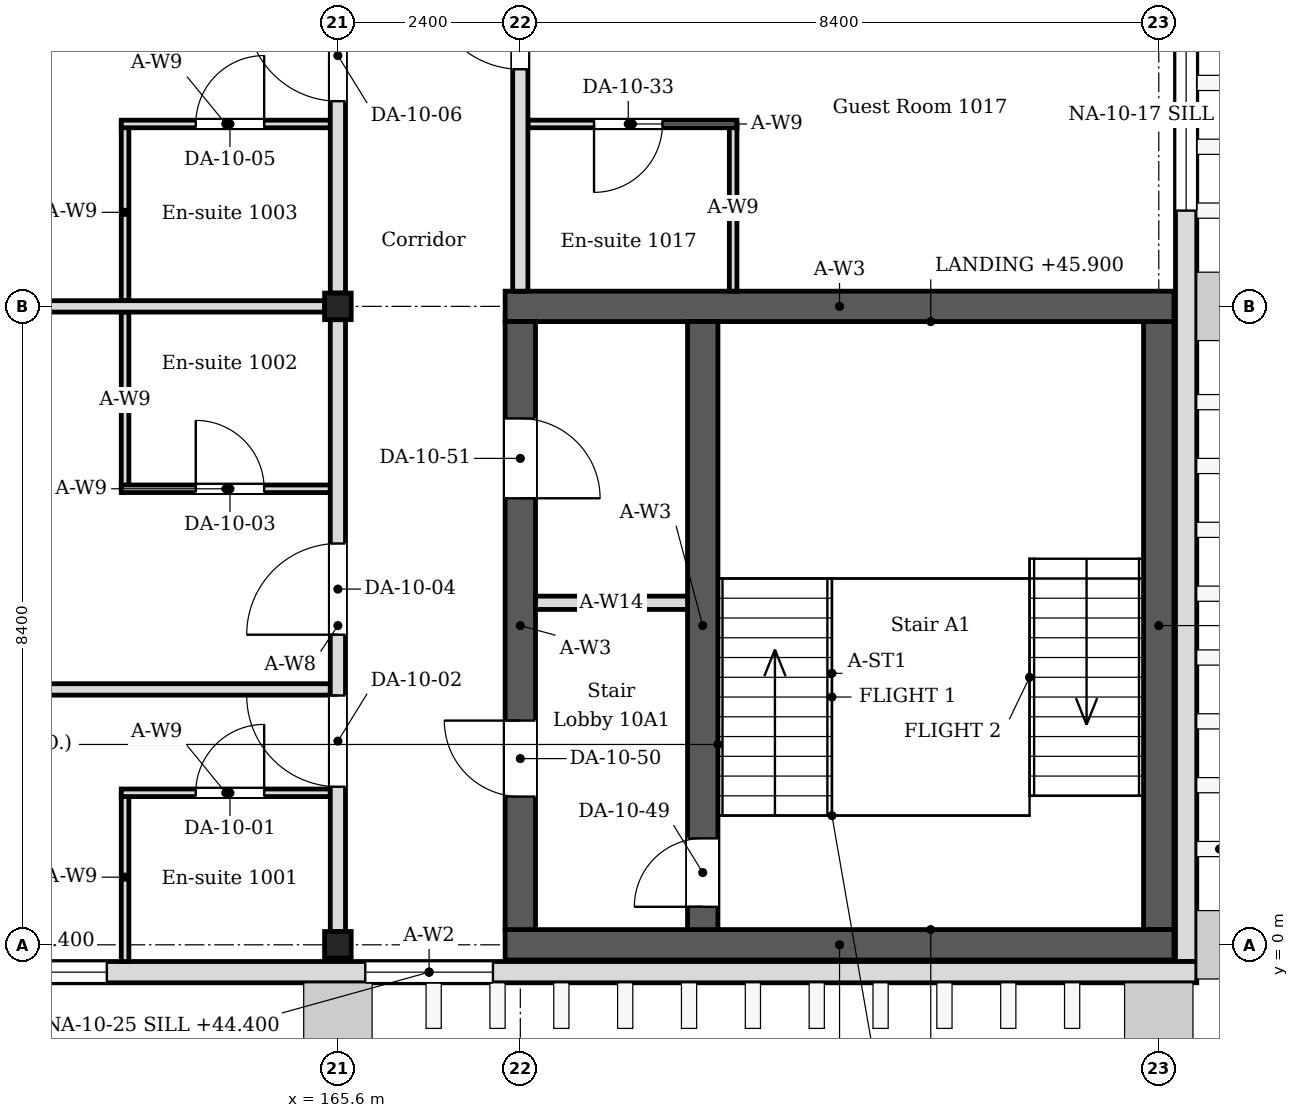
"""IFC4 building model, lengths in metres.
Left out: names, types, materials, properties, quantities, classifications, styles, units other than length and angle.
Written with IfcOpenShell. Run it as: python <this file> out.ifc"""

import sys

from ifc_helpers import new_model, si_unit, direction, frame, frame_2d, origin, origin_2d, place, context, subcontext, project, spatial, rectangle, i_section, extrude, element, fill, save


model = new_model("IFC4")
c1 = context("Model", 3, precision=1e-05, world=origin(), true_north=direction((0.0, 1.0)))
c2 = subcontext(c1, "Body", "Model", "MODEL_VIEW")
j1 = project(units=[si_unit("LENGTHUNIT", "METRE"), si_unit("PLANEANGLEUNIT", "RADIAN")], contexts=[c1])
p1 = place(None, origin())
s1 = spatial("IfcSite", under=j1, at=p1, CompositionType="ELEMENT")
p2 = place(p1, origin())
s2 = spatial("IfcBuilding", under=s1, at=p2, CompositionType="ELEMENT")
p3 = place(p2, frame((0.0, 0.0, 43.8)))
s3 = spatial("IfcBuildingStorey", under=s2, at=p3, CompositionType="ELEMENT", Elevation=43.8)
for number, where, z_axis, x_axis in (
    (1, (165.6, 0.0, 0.0), (0.0, 0.0, 1.0), (1.0, 0.0, 0.0)),
    (2, (165.6, 8.4, 0.0), (0.0, 0.0, 1.0), (1.0, 0.0, 0.0)),
):
    element("IfcColumn", number, at=place(p3, frame(where, z_axis=z_axis, x_axis=x_axis)), inside=s3, PredefinedType="COLUMN", context=c2, shape_type="SweptSolid", body=[
        extrude(i_section(OverallWidth=0.35, OverallDepth=0.35, WebThickness=0.012, FlangeThickness=0.019, FilletRadius=0.013, at=origin_2d()), origin(), (0.0, 0.0, 1.0), 4.2),
    ])
for number, where, z_axis, x_axis in (
    (3, (167.8, 0.0, 0.0), (0.0, 0.0, 1.0), (1.0, 0.0, 0.0)),
    (4, (167.8, 8.4, 0.0), (0.0, 0.0, 1.0), (1.0, 0.0, 0.0)),
):
    element("IfcWall", number, at=place(p3, frame(where, z_axis=z_axis, x_axis=x_axis)), inside=s3, PredefinedType="SOLIDWALL", context=c2, shape_type="SweptSolid", body=[
        extrude(rectangle(XDim=8.8, YDim=0.4, at=frame_2d((4.4, 0.0))), origin(), (0.0, 0.0, 1.0), 4.05),
    ])
p4 = place(p3, frame((168.0, 0.2, 0.0), z_axis=(0.0, 0.0, 1.0), x_axis=(0.0, 1.0, 0.0)))
e5 = element("IfcWall", 5, at=p4, inside=s3, PredefinedType="SOLIDWALL", context=c2, shape_type="SweptSolid", body=[
    extrude(rectangle(XDim=8.0, YDim=0.4, at=frame_2d((4.0, 0.0))), origin(), (0.0, 0.0, 1.0), 4.05),
])
p5 = place(p4, frame((1.75, 0.0, 0.0)))
e6 = element("IfcOpeningElement", 6, at=p5, cuts=e5, PredefinedType="OPENING", context=c2, shape_type="SweptSolid", body=[
    extrude(rectangle(XDim=1.0, YDim=2.1, at=frame_2d((0.5, 1.05))), frame((0.0, 0.21, 0.0), z_axis=(0.0, -1.0, 0.0), x_axis=(1.0, 0.0, 0.0)), (0.0, 0.0, 1.0), 0.42),
])
p6 = place(p4, frame((5.675, 0.0, 0.0)))
e7 = element("IfcOpeningElement", 7, at=p6, cuts=e5, PredefinedType="OPENING", context=c2, shape_type="SweptSolid", body=[
    extrude(rectangle(XDim=1.05, YDim=2.1, at=frame_2d((0.525, 1.05))), frame((0.0, 0.21, 0.0), z_axis=(0.0, -1.0, 0.0), x_axis=(1.0, 0.0, 0.0)), (0.0, 0.0, 1.0), 0.42),
])
p7 = place(p3, frame((176.4, 0.2, 0.0), z_axis=(0.0, 0.0, 1.0), x_axis=(0.0, 1.0, 0.0)))
e8 = element("IfcWall", 8, at=p7, inside=s3, PredefinedType="SOLIDWALL", context=c2, shape_type="SweptSolid", body=[
    extrude(rectangle(XDim=8.0, YDim=0.4, at=frame_2d((4.0, 0.0))), origin(), (0.0, 0.0, 1.0), 4.05),
])
p8 = place(p3, frame((176.76, -0.22, 0.0), z_axis=(0.0, 0.0, 1.0), x_axis=(0.0, 1.0, 0.0)))
e9 = element("IfcWall", 9, at=p8, inside=s3, PredefinedType="SOLIDWALL", context=c2, shape_type="SweptSolid", body=[
    extrude(rectangle(XDim=42.57, YDim=0.28, at=frame_2d((21.285, 0.0))), origin(), (0.0, 0.0, 1.0), 4.05),
])
p9 = place(p8, frame((9.88, 0.0, 0.6)))
e10 = element("IfcOpeningElement", 10, at=p9, cuts=e9, PredefinedType="OPENING", context=c2, shape_type="SweptSolid", body=[
    extrude(rectangle(XDim=2.52, YDim=2.4, at=frame_2d((1.26, 1.2))), frame((0.0, 0.15, 0.0), z_axis=(0.0, -1.0, 0.0), x_axis=(1.0, 0.0, 0.0)), (0.0, 0.0, 1.0), 0.3),
])
p10 = place(p8, frame((14.08, 0.0, 0.6)))
e11 = element("IfcOpeningElement", 11, at=p10, cuts=e9, PredefinedType="OPENING", context=c2, shape_type="SweptSolid", body=[
    extrude(rectangle(XDim=2.52, YDim=2.4, at=frame_2d((1.26, 1.2))), frame((0.0, 0.15, 0.0), z_axis=(0.0, -1.0, 0.0), x_axis=(1.0, 0.0, 0.0)), (0.0, 0.0, 1.0), 0.3),
])
p11 = place(p8, frame((17.86, 0.0, 0.6)))
e12 = element("IfcOpeningElement", 12, at=p11, cuts=e9, PredefinedType="OPENING", context=c2, shape_type="SweptSolid", body=[
    extrude(rectangle(XDim=2.52, YDim=2.4, at=frame_2d((1.26, 1.2))), frame((0.0, 0.15, 0.0), z_axis=(0.0, -1.0, 0.0), x_axis=(1.0, 0.0, 0.0)), (0.0, 0.0, 1.0), 0.3),
])
p12 = place(p8, frame((22.06, 0.0, 0.45)))
e13 = element("IfcOpeningElement", 13, at=p12, cuts=e9, PredefinedType="OPENING", context=c2, shape_type="SweptSolid", body=[
    extrude(rectangle(XDim=2.52, YDim=2.1, at=frame_2d((1.26, 1.05))), frame((0.0, 0.15, 0.0), z_axis=(0.0, -1.0, 0.0), x_axis=(1.0, 0.0, 0.0)), (0.0, 0.0, 1.0), 0.3),
])
p13 = place(p3, frame((156.7, -0.36, 0.0), z_axis=(0.0, 0.0, 1.0), x_axis=(1.0, 0.0, 0.0)))
e14 = element("IfcWall", 14, at=p13, inside=s3, PredefinedType="SOLIDWALL", context=c2, shape_type="SweptSolid", body=[
    extrude(rectangle(XDim=20.2, YDim=0.28, at=frame_2d((10.1, 0.0))), origin(), (0.0, 0.0, 1.0), 4.05),
])
p14 = place(p13, frame((9.26, 0.0, 0.6)))
e15 = element("IfcOpeningElement", 15, at=p14, cuts=e14, PredefinedType="OPENING", context=c2, shape_type="SweptSolid", body=[
    extrude(rectangle(XDim=1.68, YDim=2.4, at=frame_2d((0.84, 1.2))), frame((0.0, 0.15, 0.0), z_axis=(0.0, -1.0, 0.0), x_axis=(1.0, 0.0, 0.0)), (0.0, 0.0, 1.0), 0.3),
])
p15 = place(p13, frame((3.34, 0.0, 0.6)))
e16 = element("IfcOpeningElement", 16, at=p15, cuts=e14, PredefinedType="OPENING", context=c2, shape_type="SweptSolid", body=[
    extrude(rectangle(XDim=2.52, YDim=2.4, at=frame_2d((1.26, 1.2))), frame((0.0, 0.15, 0.0), z_axis=(0.0, -1.0, 0.0), x_axis=(1.0, 0.0, 0.0)), (0.0, 0.0, 1.0), 0.3),
])
p16 = place(p3, frame((162.8, -0.22, 0.0), z_axis=(0.0, 0.0, 1.0), x_axis=(0.0, 1.0, 0.0)))
e17 = element("IfcWall", 17, at=p16, inside=s3, PredefinedType="PARTITIONING", context=c2, shape_type="SweptSolid", body=[
    extrude(rectangle(XDim=2.22, YDim=0.1, at=frame_2d((1.11, 0.0))), origin(), (0.0, 0.0, 1.0), 4.05),
])
p17 = place(p3, frame((162.75, 2.0, 0.0), z_axis=(0.0, 0.0, 1.0), x_axis=(1.0, 0.0, 0.0)))
e18 = element("IfcWall", 18, at=p17, inside=s3, PredefinedType="PARTITIONING", context=c2, shape_type="SweptSolid", body=[
    extrude(rectangle(XDim=2.75, YDim=0.1, at=frame_2d((1.375, 0.0))), origin(), (0.0, 0.0, 1.0), 4.05),
])
p18 = place(p17, frame((0.98, 0.0, 0.0)))
e19 = element("IfcOpeningElement", 19, at=p18, cuts=e18, PredefinedType="OPENING", context=c2, shape_type="SweptSolid", body=[
    extrude(rectangle(XDim=0.9, YDim=2.1, at=frame_2d((0.45, 1.05))), frame((0.0, 0.06, 0.0), z_axis=(0.0, -1.0, 0.0), x_axis=(1.0, 0.0, 0.0)), (0.0, 0.0, 1.0), 0.12),
])
p19 = place(p3, frame((162.8, 6.0, 0.0), z_axis=(0.0, 0.0, 1.0), x_axis=(0.0, 1.0, 0.0)))
e20 = element("IfcWall", 20, at=p19, inside=s3, PredefinedType="PARTITIONING", context=c2, shape_type="SweptSolid", body=[
    extrude(rectangle(XDim=2.325, YDim=0.1, at=frame_2d((1.163, 0.0))), origin(), (0.0, 0.0, 1.0), 4.05),
])
p20 = place(p3, frame((162.75, 6.0, 0.0), z_axis=(0.0, 0.0, 1.0), x_axis=(1.0, 0.0, 0.0)))
e21 = element("IfcWall", 21, at=p20, inside=s3, PredefinedType="PARTITIONING", context=c2, shape_type="SweptSolid", body=[
    extrude(rectangle(XDim=2.75, YDim=0.1, at=frame_2d((1.375, 0.0))), origin(), (0.0, 0.0, 1.0), 4.05),
])
p21 = place(p20, frame((0.98, 0.0, 0.0)))
e22 = element("IfcOpeningElement", 22, at=p21, cuts=e21, PredefinedType="OPENING", context=c2, shape_type="SweptSolid", body=[
    extrude(rectangle(XDim=0.9, YDim=2.1, at=frame_2d((0.45, 1.05))), frame((0.0, 0.06, 0.0), z_axis=(0.0, -1.0, 0.0), x_axis=(1.0, 0.0, 0.0)), (0.0, 0.0, 1.0), 0.12),
])
p22 = place(p3, frame((162.8, 8.475, 0.0), z_axis=(0.0, 0.0, 1.0), x_axis=(0.0, 1.0, 0.0)))
e23 = element("IfcWall", 23, at=p22, inside=s3, PredefinedType="PARTITIONING", context=c2, shape_type="SweptSolid", body=[
    extrude(rectangle(XDim=2.325, YDim=0.1, at=frame_2d((1.163, 0.0))), origin(), (0.0, 0.0, 1.0), 4.05),
])
p23 = place(p3, frame((162.75, 10.8, 0.0), z_axis=(0.0, 0.0, 1.0), x_axis=(1.0, 0.0, 0.0)))
e24 = element("IfcWall", 24, at=p23, inside=s3, PredefinedType="PARTITIONING", context=c2, shape_type="SweptSolid", body=[
    extrude(rectangle(XDim=2.75, YDim=0.1, at=frame_2d((1.375, 0.0))), origin(), (0.0, 0.0, 1.0), 4.05),
])
p24 = place(p23, frame((0.98, 0.0, 0.0)))
e25 = element("IfcOpeningElement", 25, at=p24, cuts=e24, PredefinedType="OPENING", context=c2, shape_type="SweptSolid", body=[
    extrude(rectangle(XDim=0.9, YDim=2.1, at=frame_2d((0.45, 1.05))), frame((0.0, 0.06, 0.0), z_axis=(0.0, -1.0, 0.0), x_axis=(1.0, 0.0, 0.0)), (0.0, 0.0, 1.0), 0.12),
])
p25 = place(p3, frame((170.8, 8.6, 0.0), z_axis=(0.0, 0.0, 1.0), x_axis=(0.0, 1.0, 0.0)))
e26 = element("IfcWall", 26, at=p25, inside=s3, PredefinedType="PARTITIONING", context=c2, shape_type="SweptSolid", body=[
    extrude(rectangle(XDim=2.2, YDim=0.1, at=frame_2d((1.1, 0.0))), origin(), (0.0, 0.0, 1.0), 4.05),
])
p26 = place(p3, frame((170.85, 10.8, 0.0), z_axis=(0.0, 0.0, 1.0), x_axis=(-1.0, 0.0, 0.0)))
e27 = element("IfcWall", 27, at=p26, inside=s3, PredefinedType="PARTITIONING", context=c2, shape_type="SweptSolid", body=[
    extrude(rectangle(XDim=2.75, YDim=0.1, at=frame_2d((1.375, 0.0))), origin(), (0.0, 0.0, 1.0), 4.05),
])
p27 = place(p26, frame((0.98, 0.0, 0.0)))
e28 = element("IfcOpeningElement", 28, at=p27, cuts=e27, PredefinedType="OPENING", context=c2, shape_type="SweptSolid", body=[
    extrude(rectangle(XDim=0.9, YDim=2.1, at=frame_2d((0.45, 1.05))), frame((0.0, 0.06, 0.0), z_axis=(0.0, -1.0, 0.0), x_axis=(1.0, 0.0, 0.0)), (0.0, 0.0, 1.0), 0.12),
])
p28 = place(p3, frame((157.375, 8.4, 0.0), z_axis=(0.0, 0.0, 1.0), x_axis=(1.0, 0.0, 0.0)))
e29 = element("IfcWall", 29, at=p28, inside=s3, PredefinedType="PARTITIONING", context=c2, shape_type="SweptSolid", body=[
    extrude(rectangle(XDim=8.05, YDim=0.15, at=frame_2d((4.025, 0.0))), origin(), (0.0, 0.0, 1.0), 3.604),
])
p29 = place(p3, frame((156.98, 3.36, 0.0), z_axis=(0.0, 0.0, 1.0), x_axis=(1.0, 0.0, 0.0)))
e30 = element("IfcWall", 30, at=p29, inside=s3, PredefinedType="PARTITIONING", context=c2, shape_type="SweptSolid", body=[
    extrude(rectangle(XDim=8.52, YDim=0.15, at=frame_2d((4.26, 0.0))), origin(), (0.0, 0.0, 1.0), 3.604),
])
p30 = place(p3, frame((165.6, 0.175, 0.0), z_axis=(0.0, 0.0, 1.0), x_axis=(0.0, 1.0, 0.0)))
e31 = element("IfcWall", 31, at=p30, inside=s3, PredefinedType="PARTITIONING", context=c2, shape_type="SweptSolid", body=[
    extrude(rectangle(XDim=8.05, YDim=0.2, at=frame_2d((4.025, 0.0))), origin(), (0.0, 0.0, 1.0), 3.45),
])
p31 = place(p30, frame((1.905, 0.0, 0.0)))
e32 = element("IfcOpeningElement", 32, at=p31, cuts=e31, PredefinedType="OPENING", context=c2, shape_type="SweptSolid", body=[
    extrude(rectangle(XDim=1.2, YDim=2.1, at=frame_2d((0.6, 1.05))), frame((0.0, 0.11, 0.0), z_axis=(0.0, -1.0, 0.0), x_axis=(1.0, 0.0, 0.0)), (0.0, 0.0, 1.0), 0.22),
])
p32 = place(p30, frame((3.905, 0.0, 0.0)))
e33 = element("IfcOpeningElement", 33, at=p32, cuts=e31, PredefinedType="OPENING", context=c2, shape_type="SweptSolid", body=[
    extrude(rectangle(XDim=1.2, YDim=2.1, at=frame_2d((0.6, 1.05))), frame((0.0, 0.11, 0.0), z_axis=(0.0, -1.0, 0.0), x_axis=(1.0, 0.0, 0.0)), (0.0, 0.0, 1.0), 0.22),
])
p33 = place(p3, frame((165.6, 8.575, 0.0), z_axis=(0.0, 0.0, 1.0), x_axis=(0.0, 1.0, 0.0)))
e34 = element("IfcWall", 34, at=p33, inside=s3, PredefinedType="PARTITIONING", context=c2, shape_type="SweptSolid", body=[
    extrude(rectangle(XDim=8.05, YDim=0.2, at=frame_2d((4.025, 0.0))), origin(), (0.0, 0.0, 1.0), 3.45),
])
p34 = place(p33, frame((2.525, 0.0, 0.0)))
e35 = element("IfcOpeningElement", 35, at=p34, cuts=e34, PredefinedType="OPENING", context=c2, shape_type="SweptSolid", body=[
    extrude(rectangle(XDim=1.2, YDim=2.1, at=frame_2d((0.6, 1.05))), frame((0.0, 0.11, 0.0), z_axis=(0.0, -1.0, 0.0), x_axis=(1.0, 0.0, 0.0)), (0.0, 0.0, 1.0), 0.22),
])
p35 = place(p33, frame((4.325, 0.0, 0.0)))
e36 = element("IfcOpeningElement", 36, at=p35, cuts=e34, PredefinedType="OPENING", context=c2, shape_type="SweptSolid", body=[
    extrude(rectangle(XDim=1.2, YDim=2.1, at=frame_2d((0.6, 1.05))), frame((0.0, 0.11, 0.0), z_axis=(0.0, -1.0, 0.0), x_axis=(1.0, 0.0, 0.0)), (0.0, 0.0, 1.0), 0.22),
])
p36 = place(p3, frame((168.0, 8.6, 0.0), z_axis=(0.0, 0.0, 1.0), x_axis=(0.0, 1.0, 0.0)))
e37 = element("IfcWall", 37, at=p36, inside=s3, PredefinedType="PARTITIONING", context=c2, shape_type="SweptSolid", body=[
    extrude(rectangle(XDim=8.025, YDim=0.2, at=frame_2d((4.012, 0.0))), origin(), (0.0, 0.0, 1.0), 3.45),
])
p37 = place(p36, frame((2.92, 0.0, 0.0)))
e38 = element("IfcOpeningElement", 38, at=p37, cuts=e37, PredefinedType="OPENING", context=c2, shape_type="SweptSolid", body=[
    extrude(rectangle(XDim=1.2, YDim=2.1, at=frame_2d((0.6, 1.05))), frame((0.0, 0.11, 0.0), z_axis=(0.0, -1.0, 0.0), x_axis=(1.0, 0.0, 0.0)), (0.0, 0.0, 1.0), 0.22),
])
p38 = place(p36, frame((4.92, 0.0, 0.0)))
e39 = element("IfcOpeningElement", 39, at=p38, cuts=e37, PredefinedType="OPENING", context=c2, shape_type="SweptSolid", body=[
    extrude(rectangle(XDim=1.2, YDim=2.1, at=frame_2d((0.6, 1.05))), frame((0.0, 0.11, 0.0), z_axis=(0.0, -1.0, 0.0), x_axis=(1.0, 0.0, 0.0)), (0.0, 0.0, 1.0), 0.22),
])
p39 = place(p3, frame((170.4, 0.2, 0.0), z_axis=(0.0, 0.0, 1.0), x_axis=(0.0, 1.0, 0.0)))
e40 = element("IfcWall", 40, at=p39, inside=s3, PredefinedType="SOLIDWALL", context=c2, shape_type="SweptSolid", body=[
    extrude(rectangle(XDim=8.0, YDim=0.4, at=frame_2d((4.0, 0.0))), origin(), (0.0, 0.0, 1.0), 4.05),
])
p40 = place(p39, frame((0.3, 0.0, 0.0)))
e41 = element("IfcOpeningElement", 41, at=p40, cuts=e40, PredefinedType="OPENING", context=c2, shape_type="SweptSolid", body=[
    extrude(rectangle(XDim=0.9, YDim=2.1, at=frame_2d((0.45, 1.05))), frame((0.0, 0.21, 0.0), z_axis=(0.0, -1.0, 0.0), x_axis=(1.0, 0.0, 0.0)), (0.0, 0.0, 1.0), 0.42),
])
p41 = place(p3, frame((168.2, 4.5, 0.0), z_axis=(0.0, 0.0, 1.0), x_axis=(1.0, 0.0, 0.0)))
e42 = element("IfcWall", 42, at=p41, inside=s3, PredefinedType="PARTITIONING", context=c2, shape_type="SweptSolid", body=[
    extrude(rectangle(XDim=2.0, YDim=0.175, at=frame_2d((1.0, 0.0))), origin(), (0.0, 0.0, 1.0), 4.05),
])
p42 = place(p9, origin())
e43 = element("IfcWindow", 43, at=p42, inside=s3, PartitioningType="SINGLE_PANEL", PredefinedType="WINDOW", context=c2, shape_type="SweptSolid", body=[
    extrude(rectangle(XDim=2.52, YDim=2.4, at=frame_2d((1.26, 1.2))), frame((0.0, 0.03, 0.0), z_axis=(0.0, -1.0, 0.0), x_axis=(1.0, 0.0, 0.0)), (0.0, 0.0, 1.0), 0.06),
])
fill(e10, e43)
p43 = place(p14, origin())
e44 = element("IfcWindow", 44, at=p43, inside=s3, PartitioningType="SINGLE_PANEL", PredefinedType="WINDOW", context=c2, shape_type="SweptSolid", body=[
    extrude(rectangle(XDim=1.68, YDim=2.4, at=frame_2d((0.84, 1.2))), frame((0.0, 0.03, 0.0), z_axis=(0.0, -1.0, 0.0), x_axis=(1.0, 0.0, 0.0)), (0.0, 0.0, 1.0), 0.06),
])
fill(e15, e44)
p44 = place(p15, origin())
e45 = element("IfcWindow", 45, at=p44, inside=s3, PartitioningType="SINGLE_PANEL", PredefinedType="WINDOW", context=c2, shape_type="SweptSolid", body=[
    extrude(rectangle(XDim=2.52, YDim=2.4, at=frame_2d((1.26, 1.2))), frame((0.0, 0.03, 0.0), z_axis=(0.0, -1.0, 0.0), x_axis=(1.0, 0.0, 0.0)), (0.0, 0.0, 1.0), 0.06),
])
fill(e16, e45)
p45 = place(p18, origin())
e46 = element("IfcDoor", 46, at=p45, inside=s3, OperationType="SINGLE_SWING_RIGHT", PredefinedType="DOOR", context=c2, shape_type="SweptSolid", body=[
    extrude(rectangle(XDim=0.9, YDim=2.1, at=frame_2d((0.45, 1.05))), frame((0.0, 0.025, 0.0), z_axis=(0.0, -1.0, 0.0), x_axis=(1.0, 0.0, 0.0)), (0.0, 0.0, 1.0), 0.05),
])
fill(e19, e46)
p46 = place(p31, origin())
e47 = element("IfcDoor", 47, at=p46, inside=s3, OperationType="SINGLE_SWING_RIGHT", PredefinedType="DOOR", context=c2, shape_type="SweptSolid", body=[
    extrude(rectangle(XDim=1.2, YDim=2.1, at=frame_2d((0.6, 1.05))), frame((0.0, 0.025, 0.0), z_axis=(0.0, -1.0, 0.0), x_axis=(1.0, 0.0, 0.0)), (0.0, 0.0, 1.0), 0.05),
])
fill(e32, e47)
p47 = place(p21, origin())
e48 = element("IfcDoor", 48, at=p47, inside=s3, OperationType="SINGLE_SWING_LEFT", PredefinedType="DOOR", context=c2, shape_type="SweptSolid", body=[
    extrude(rectangle(XDim=0.9, YDim=2.1, at=frame_2d((0.45, 1.05))), frame((0.0, 0.025, 0.0), z_axis=(0.0, -1.0, 0.0), x_axis=(1.0, 0.0, 0.0)), (0.0, 0.0, 1.0), 0.05),
])
fill(e22, e48)
p48 = place(p32, origin())
e49 = element("IfcDoor", 49, at=p48, inside=s3, OperationType="SINGLE_SWING_LEFT", PredefinedType="DOOR", context=c2, shape_type="SweptSolid", body=[
    extrude(rectangle(XDim=1.2, YDim=2.1, at=frame_2d((0.6, 1.05))), frame((0.0, 0.025, 0.0), z_axis=(0.0, -1.0, 0.0), x_axis=(1.0, 0.0, 0.0)), (0.0, 0.0, 1.0), 0.05),
])
fill(e33, e49)
p49 = place(p24, origin())
e50 = element("IfcDoor", 50, at=p49, inside=s3, OperationType="SINGLE_SWING_RIGHT", PredefinedType="DOOR", context=c2, shape_type="SweptSolid", body=[
    extrude(rectangle(XDim=0.9, YDim=2.1, at=frame_2d((0.45, 1.05))), frame((0.0, 0.025, 0.0), z_axis=(0.0, -1.0, 0.0), x_axis=(1.0, 0.0, 0.0)), (0.0, 0.0, 1.0), 0.05),
])
fill(e25, e50)
p50 = place(p34, origin())
e51 = element("IfcDoor", 51, at=p50, inside=s3, OperationType="SINGLE_SWING_RIGHT", PredefinedType="DOOR", context=c2, shape_type="SweptSolid", body=[
    extrude(rectangle(XDim=1.2, YDim=2.1, at=frame_2d((0.6, 1.05))), frame((0.0, 0.025, 0.0), z_axis=(0.0, -1.0, 0.0), x_axis=(1.0, 0.0, 0.0)), (0.0, 0.0, 1.0), 0.05),
])
fill(e35, e51)
p51 = place(p27, origin())
e52 = element("IfcDoor", 52, at=p51, inside=s3, OperationType="SINGLE_SWING_RIGHT", PredefinedType="DOOR", context=c2, shape_type="SweptSolid", body=[
    extrude(rectangle(XDim=0.9, YDim=2.1, at=frame_2d((0.45, 1.05))), frame((0.0, 0.025, 0.0), z_axis=(0.0, -1.0, 0.0), x_axis=(1.0, 0.0, 0.0)), (0.0, 0.0, 1.0), 0.05),
])
fill(e28, e52)
p52 = place(p37, origin())
e53 = element("IfcDoor", 53, at=p52, inside=s3, OperationType="SINGLE_SWING_RIGHT", PredefinedType="DOOR", context=c2, shape_type="SweptSolid", body=[
    extrude(rectangle(XDim=1.2, YDim=2.1, at=frame_2d((0.6, 1.05))), frame((0.0, 0.025, 0.0), z_axis=(0.0, -1.0, 0.0), x_axis=(1.0, 0.0, 0.0)), (0.0, 0.0, 1.0), 0.05),
])
fill(e38, e53)
p53 = place(p40, origin())
e54 = element("IfcDoor", 54, at=p53, inside=s3, OperationType="SINGLE_SWING_LEFT", PredefinedType="DOOR", context=c2, shape_type="SweptSolid", body=[
    extrude(rectangle(XDim=0.9, YDim=2.1, at=frame_2d((0.45, 1.05))), frame((0.0, 0.025, 0.0), z_axis=(0.0, -1.0, 0.0), x_axis=(1.0, 0.0, 0.0)), (0.0, 0.0, 1.0), 0.05),
])
fill(e41, e54)
p54 = place(p5, origin())
e55 = element("IfcDoor", 55, at=p54, inside=s3, OperationType="SINGLE_SWING_RIGHT", PredefinedType="DOOR", context=c2, shape_type="SweptSolid", body=[
    extrude(rectangle(XDim=1.0, YDim=2.1, at=frame_2d((0.5, 1.05))), frame((0.0, 0.025, 0.0), z_axis=(0.0, -1.0, 0.0), x_axis=(1.0, 0.0, 0.0)), (0.0, 0.0, 1.0), 0.05),
])
fill(e6, e55)
p55 = place(p6, origin())
e56 = element("IfcDoor", 56, at=p55, inside=s3, OperationType="SINGLE_SWING_LEFT", PredefinedType="DOOR", context=c2, shape_type="SweptSolid", body=[
    extrude(rectangle(XDim=1.05, YDim=2.1, at=frame_2d((0.525, 1.05))), frame((0.0, 0.025, 0.0), z_axis=(0.0, -1.0, 0.0), x_axis=(1.0, 0.0, 0.0)), (0.0, 0.0, 1.0), 0.05),
])
fill(e7, e56)
save(model, sys.argv[1])
